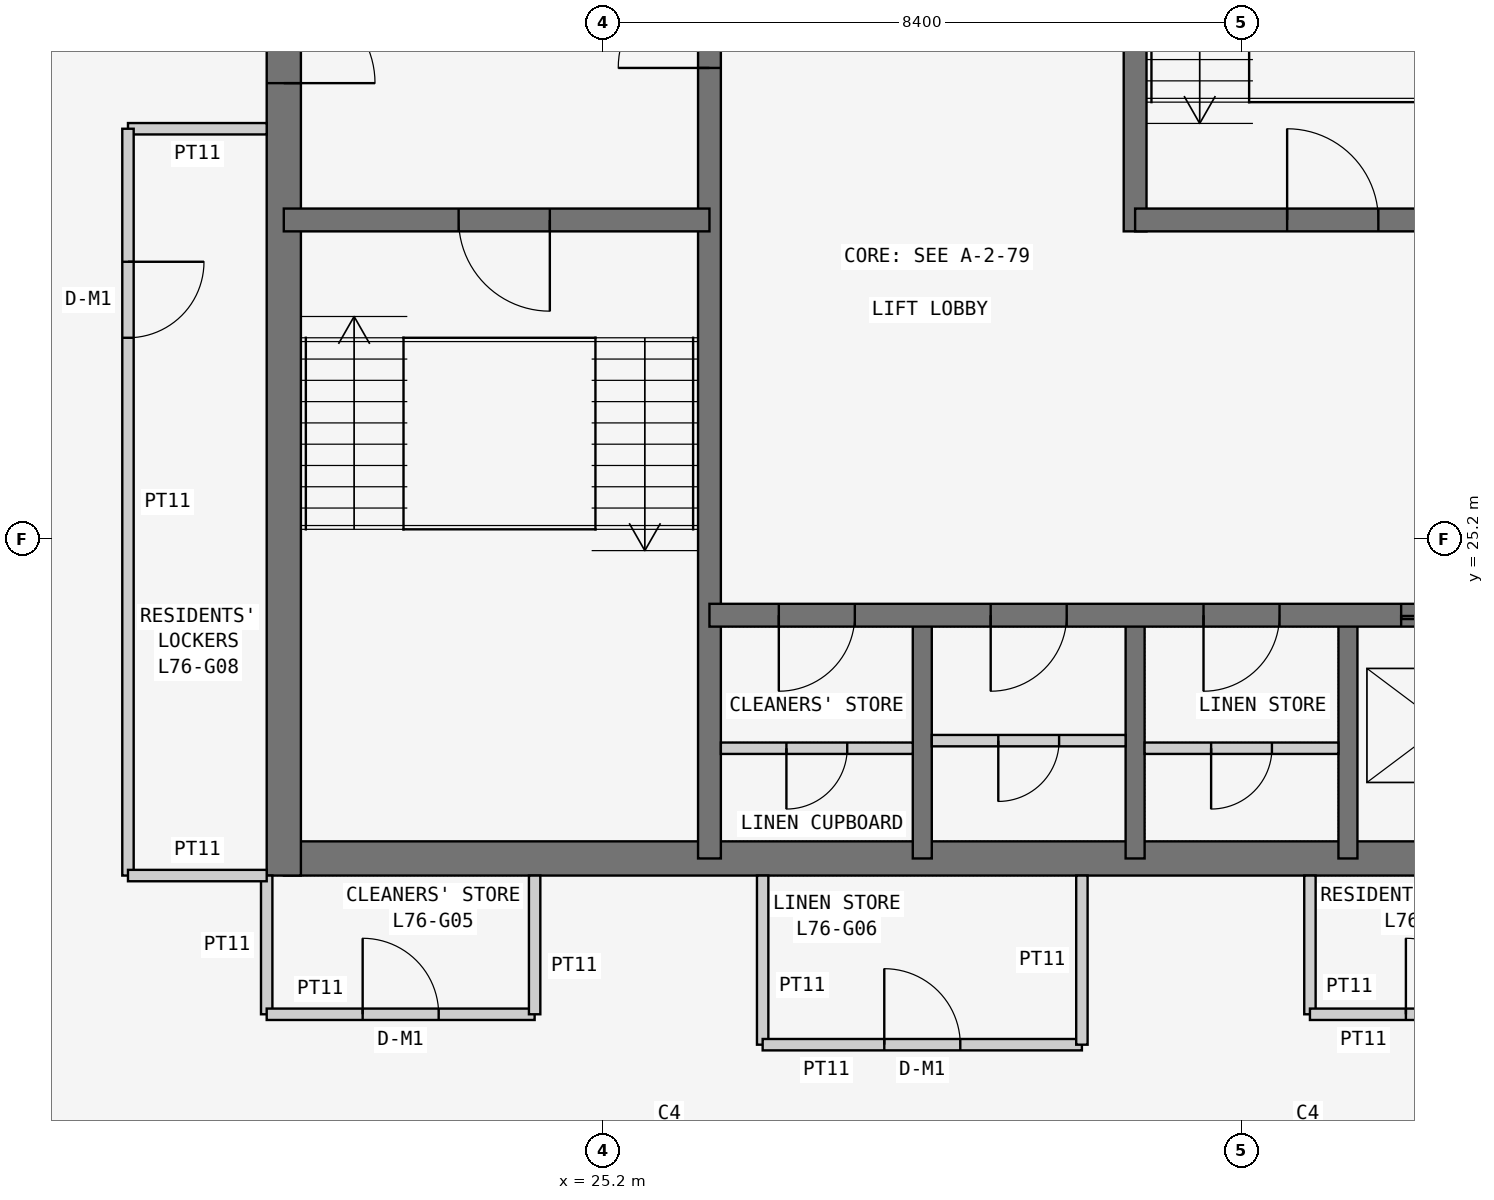
"""IFC4 building model, lengths in metres.
Left out: names, types, materials, properties, quantities, classifications, styles, units other than length and angle.
Written with IfcOpenShell. Run it as: python <this file> out.ifc"""

import sys

from ifc_helpers import new_model, si_unit, direction, frame, frame_2d, origin, place, context, subcontext, project, spatial, rectangle, extrude, element, fill, save


model = new_model("IFC4")
c1 = context("Model", 3, precision=1e-05, world=origin(), true_north=direction((0.0, 1.0)))
c2 = subcontext(c1, "Body", "Model", "MODEL_VIEW")
j1 = project(units=[si_unit("LENGTHUNIT", "METRE"), si_unit("PLANEANGLEUNIT", "RADIAN")], contexts=[c1])
p1 = place(None, origin())
s1 = spatial("IfcSite", under=j1, at=p1, CompositionType="ELEMENT")
p2 = place(p1, origin())
s2 = spatial("IfcBuilding", under=s1, at=p2, CompositionType="ELEMENT")
p3 = place(p2, frame((0.0, 0.0, 290.1)))
s3 = spatial("IfcBuildingStorey", under=s2, at=p3, CompositionType="ELEMENT", Elevation=290.1)
p4 = place(p3, frame((21.0, 21.0, 0.0), z_axis=(0.0, 0.0, 1.0), x_axis=(1.0, 0.0, 0.0)))
e1 = element("IfcWall", 1, at=p4, inside=s3, PredefinedType="SHEAR", context=c2, shape_type="SweptSolid", body=[
    extrude(rectangle(XDim=17.025, YDim=0.45, at=frame_2d((8.512, 0.0))), origin(), (0.0, 0.0, 1.0), 3.6),
])
p5 = place(p3, frame((21.0, 37.8, 0.0), z_axis=(0.0, 0.0, 1.0), x_axis=(0.0, -1.0, 0.0)))
e2 = element("IfcWall", 2, at=p5, inside=s3, PredefinedType="SHEAR", context=c2, shape_type="SweptSolid", body=[
    extrude(rectangle(XDim=17.025, YDim=0.45, at=frame_2d((8.513, 0.0))), origin(), (0.0, 0.0, 1.0), 3.6),
])
p6 = place(p5, frame((5.4, 0.0, 0.0)))
e3 = element("IfcOpeningElement", 3, at=p6, cuts=e2, PredefinedType="OPENING", context=c2, shape_type="SweptSolid", body=[
    extrude(rectangle(XDim=1.2, YDim=2.1, at=frame_2d((0.6, 1.05))), frame((0.0, 0.235, 0.0), z_axis=(0.0, -1.0, 0.0), x_axis=(1.0, 0.0, 0.0)), (0.0, 0.0, 1.0), 0.47),
])
p7 = place(p3, frame((26.6, 21.0, 0.0), z_axis=(0.0, 0.0, 1.0), x_axis=(0.0, 1.0, 0.0)))
e4 = element("IfcWall", 4, at=p7, inside=s3, PredefinedType="SHEAR", context=c2, shape_type="SweptSolid", body=[
    extrude(rectangle(XDim=16.8, YDim=0.3, at=frame_2d((8.4, 0.0))), origin(), (0.0, 0.0, 1.0), 3.6),
])
p8 = place(p7, frame((10.4, 0.0, 0.0)))
e5 = element("IfcOpeningElement", 5, at=p8, cuts=e4, PredefinedType="OPENING", context=c2, shape_type="SweptSolid", body=[
    extrude(rectangle(XDim=1.2, YDim=2.1, at=frame_2d((0.6, 1.05))), frame((0.0, 0.16, 0.0), z_axis=(0.0, -1.0, 0.0), x_axis=(1.0, 0.0, 0.0)), (0.0, 0.0, 1.0), 0.32),
])
p9 = place(p3, frame((21.0, 29.4, 0.0), z_axis=(0.0, 0.0, 1.0), x_axis=(1.0, 0.0, 0.0)))
e6 = element("IfcWall", 6, at=p9, inside=s3, PredefinedType="SHEAR", context=c2, shape_type="SweptSolid", body=[
    extrude(rectangle(XDim=5.6, YDim=0.3, at=frame_2d((2.8, 0.0))), origin(), (0.0, 0.0, 1.0), 3.6),
])
p10 = place(p9, frame((2.3, 0.0, 0.0)))
e7 = element("IfcOpeningElement", 7, at=p10, cuts=e6, PredefinedType="OPENING", context=c2, shape_type="SweptSolid", body=[
    extrude(rectangle(XDim=1.2, YDim=2.1, at=frame_2d((0.6, 1.05))), frame((0.0, 0.16, 0.0), z_axis=(0.0, -1.0, 0.0), x_axis=(1.0, 0.0, 0.0)), (0.0, 0.0, 1.0), 0.32),
])
p11 = place(p3, frame((26.6, 24.2, 0.0), z_axis=(0.0, 0.0, 1.0), x_axis=(1.0, 0.0, 0.0)))
e8 = element("IfcWall", 8, at=p11, inside=s3, PredefinedType="SHEAR", context=c2, shape_type="SweptSolid", body=[
    extrude(rectangle(XDim=11.2, YDim=0.3, at=frame_2d((5.6, 0.0))), origin(), (0.0, 0.0, 1.0), 3.6),
])
p12 = place(p11, frame((0.913, 0.0, 0.0)))
e9 = element("IfcOpeningElement", 9, at=p12, cuts=e8, PredefinedType="OPENING", context=c2, shape_type="SweptSolid", body=[
    extrude(rectangle(XDim=1.0, YDim=2.1, at=frame_2d((0.5, 1.05))), frame((0.0, 0.16, 0.0), z_axis=(0.0, -1.0, 0.0), x_axis=(1.0, 0.0, 0.0)), (0.0, 0.0, 1.0), 0.32),
])
p13 = place(p11, frame((3.7, 0.0, 0.0)))
e10 = element("IfcOpeningElement", 10, at=p13, cuts=e8, PredefinedType="OPENING", context=c2, shape_type="SweptSolid", body=[
    extrude(rectangle(XDim=1.0, YDim=2.1, at=frame_2d((0.5, 1.05))), frame((0.0, 0.16, 0.0), z_axis=(0.0, -1.0, 0.0), x_axis=(1.0, 0.0, 0.0)), (0.0, 0.0, 1.0), 0.32),
])
p14 = place(p11, frame((6.5, 0.0, 0.0)))
e11 = element("IfcOpeningElement", 11, at=p14, cuts=e8, PredefinedType="OPENING", context=c2, shape_type="SweptSolid", body=[
    extrude(rectangle(XDim=1.0, YDim=2.1, at=frame_2d((0.5, 1.05))), frame((0.0, 0.16, 0.0), z_axis=(0.0, -1.0, 0.0), x_axis=(1.0, 0.0, 0.0)), (0.0, 0.0, 1.0), 0.32),
])
p15 = place(p11, frame((9.1, 0.0, 0.0)))
e12 = element("IfcOpeningElement", 12, at=p15, cuts=e8, PredefinedType="OPENING", context=c2, shape_type="SweptSolid", body=[
    extrude(rectangle(XDim=1.1, YDim=2.1, at=frame_2d((0.55, 1.05))), frame((0.0, 0.16, 0.0), z_axis=(0.0, -1.0, 0.0), x_axis=(1.0, 0.0, 0.0)), (0.0, 0.0, 1.0), 0.32),
])
p16 = place(p3, frame((32.2, 29.25, 0.0), z_axis=(0.0, 0.0, 1.0), x_axis=(0.0, 1.0, 0.0)))
e13 = element("IfcWall", 13, at=p16, inside=s3, PredefinedType="SHEAR", context=c2, shape_type="SweptSolid", body=[
    extrude(rectangle(XDim=8.55, YDim=0.3, at=frame_2d((4.275, 0.0))), origin(), (0.0, 0.0, 1.0), 3.6),
])
p17 = place(p3, frame((32.2, 29.4, 0.0), z_axis=(0.0, 0.0, 1.0), x_axis=(1.0, 0.0, 0.0)))
e14 = element("IfcWall", 14, at=p17, inside=s3, PredefinedType="SHEAR", context=c2, shape_type="SweptSolid", body=[
    extrude(rectangle(XDim=5.6, YDim=0.3, at=frame_2d((2.8, 0.0))), origin(), (0.0, 0.0, 1.0), 3.6),
])
p18 = place(p17, frame((2.0, 0.0, 0.0)))
e15 = element("IfcOpeningElement", 15, at=p18, cuts=e14, PredefinedType="OPENING", context=c2, shape_type="SweptSolid", body=[
    extrude(rectangle(XDim=1.2, YDim=2.1, at=frame_2d((0.6, 1.05))), frame((0.0, 0.16, 0.0), z_axis=(0.0, -1.0, 0.0), x_axis=(1.0, 0.0, 0.0)), (0.0, 0.0, 1.0), 0.32),
])
for number, where, z_axis, x_axis in (
    (16, (29.4, 21.0, 0.0), (0.0, 0.0, 1.0), (0.0, 1.0, 0.0)),
    (17, (32.2, 21.0, 0.0), (0.0, 0.0, 1.0), (0.0, 1.0, 0.0)),
    (18, (35.0, 21.0, 0.0), (0.0, 0.0, 1.0), (0.0, 1.0, 0.0)),
):
    element("IfcWall", number, at=place(p3, frame(where, z_axis=z_axis, x_axis=x_axis)), inside=s3, PredefinedType="SHEAR", context=c2, shape_type="SweptSolid", body=[
        extrude(rectangle(XDim=3.2, YDim=0.25, at=frame_2d((1.6, 0.0))), origin(), (0.0, 0.0, 1.0), 3.6),
    ])
p19 = place(p3, frame((20.775, 20.775, 0.0), z_axis=(0.0, 0.0, 1.0), x_axis=(0.0, -1.0, 0.0)))
e19 = element("IfcWall", 19, at=p19, inside=s3, PredefinedType="PARTITIONING", context=c2, shape_type="SweptSolid", body=[
    extrude(rectangle(XDim=1.825, YDim=0.15, at=frame_2d((0.913, 0.0))), origin(), (0.0, 0.0, 1.0), 3.45),
])
p20 = place(p3, frame((20.775, 18.95, 0.0), z_axis=(0.0, 0.0, 1.0), x_axis=(1.0, 0.0, 0.0)))
e20 = element("IfcWall", 20, at=p20, inside=s3, PredefinedType="PARTITIONING", context=c2, shape_type="SweptSolid", body=[
    extrude(rectangle(XDim=3.525, YDim=0.15, at=frame_2d((1.763, 0.0))), origin(), (0.0, 0.0, 1.0), 3.45),
])
p21 = place(p20, frame((1.262, 0.0, 0.0)))
e21 = element("IfcOpeningElement", 21, at=p21, cuts=e20, PredefinedType="OPENING", context=c2, shape_type="SweptSolid", body=[
    extrude(rectangle(XDim=1.0, YDim=2.1, at=frame_2d((0.5, 1.05))), frame((0.0, 0.085, 0.0), z_axis=(0.0, -1.0, 0.0), x_axis=(1.0, 0.0, 0.0)), (0.0, 0.0, 1.0), 0.17),
])
p22 = place(p3, frame((24.3, 18.95, 0.0), z_axis=(0.0, 0.0, 1.0), x_axis=(0.0, 1.0, 0.0)))
e22 = element("IfcWall", 22, at=p22, inside=s3, PredefinedType="PARTITIONING", context=c2, shape_type="SweptSolid", body=[
    extrude(rectangle(XDim=1.825, YDim=0.15, at=frame_2d((0.913, 0.0))), origin(), (0.0, 0.0, 1.0), 3.45),
])
p23 = place(p3, frame((27.3, 20.775, 0.0), z_axis=(0.0, 0.0, 1.0), x_axis=(0.0, -1.0, 0.0)))
e23 = element("IfcWall", 23, at=p23, inside=s3, PredefinedType="PARTITIONING", context=c2, shape_type="SweptSolid", body=[
    extrude(rectangle(XDim=2.225, YDim=0.15, at=frame_2d((1.112, 0.0))), origin(), (0.0, 0.0, 1.0), 3.45),
])
p24 = place(p3, frame((27.3, 18.55, 0.0), z_axis=(0.0, 0.0, 1.0), x_axis=(1.0, 0.0, 0.0)))
e24 = element("IfcWall", 24, at=p24, inside=s3, PredefinedType="PARTITIONING", context=c2, shape_type="SweptSolid", body=[
    extrude(rectangle(XDim=4.2, YDim=0.15, at=frame_2d((2.1, 0.0))), origin(), (0.0, 0.0, 1.0), 3.45),
])
p25 = place(p24, frame((1.6, 0.0, 0.0)))
e25 = element("IfcOpeningElement", 25, at=p25, cuts=e24, PredefinedType="OPENING", context=c2, shape_type="SweptSolid", body=[
    extrude(rectangle(XDim=1.0, YDim=2.1, at=frame_2d((0.5, 1.05))), frame((0.0, 0.085, 0.0), z_axis=(0.0, -1.0, 0.0), x_axis=(1.0, 0.0, 0.0)), (0.0, 0.0, 1.0), 0.17),
])
p26 = place(p3, frame((31.5, 18.55, 0.0), z_axis=(0.0, 0.0, 1.0), x_axis=(0.0, 1.0, 0.0)))
e26 = element("IfcWall", 26, at=p26, inside=s3, PredefinedType="PARTITIONING", context=c2, shape_type="SweptSolid", body=[
    extrude(rectangle(XDim=2.225, YDim=0.15, at=frame_2d((1.112, 0.0))), origin(), (0.0, 0.0, 1.0), 3.45),
])
p27 = place(p3, frame((34.5, 20.775, 0.0), z_axis=(0.0, 0.0, 1.0), x_axis=(0.0, -1.0, 0.0)))
e27 = element("IfcWall", 27, at=p27, inside=s3, PredefinedType="PARTITIONING", context=c2, shape_type="SweptSolid", body=[
    extrude(rectangle(XDim=1.825, YDim=0.15, at=frame_2d((0.913, 0.0))), origin(), (0.0, 0.0, 1.0), 3.45),
])
p28 = place(p3, frame((34.5, 18.95, 0.0), z_axis=(0.0, 0.0, 1.0), x_axis=(1.0, 0.0, 0.0)))
e28 = element("IfcWall", 28, at=p28, inside=s3, PredefinedType="PARTITIONING", context=c2, shape_type="SweptSolid", body=[
    extrude(rectangle(XDim=3.525, YDim=0.15, at=frame_2d((1.762, 0.0))), origin(), (0.0, 0.0, 1.0), 3.45),
])
p29 = place(p28, frame((1.262, 0.0, 0.0)))
e29 = element("IfcOpeningElement", 29, at=p29, cuts=e28, PredefinedType="OPENING", context=c2, shape_type="SweptSolid", body=[
    extrude(rectangle(XDim=1.0, YDim=2.1, at=frame_2d((0.5, 1.05))), frame((0.0, 0.085, 0.0), z_axis=(0.0, -1.0, 0.0), x_axis=(1.0, 0.0, 0.0)), (0.0, 0.0, 1.0), 0.17),
])
p30 = place(p3, frame((20.775, 30.6, 0.0), z_axis=(0.0, 0.0, 1.0), x_axis=(-1.0, 0.0, 0.0)))
e30 = element("IfcWall", 30, at=p30, inside=s3, PredefinedType="PARTITIONING", context=c2, shape_type="SweptSolid", body=[
    extrude(rectangle(XDim=1.825, YDim=0.15, at=frame_2d((0.913, 0.0))), origin(), (0.0, 0.0, 1.0), 3.45),
])
p31 = place(p3, frame((18.95, 30.6, 0.0), z_axis=(0.0, 0.0, 1.0), x_axis=(0.0, -1.0, 0.0)))
e31 = element("IfcWall", 31, at=p31, inside=s3, PredefinedType="PARTITIONING", context=c2, shape_type="SweptSolid", body=[
    extrude(rectangle(XDim=9.825, YDim=0.15, at=frame_2d((4.913, 0.0))), origin(), (0.0, 0.0, 1.0), 3.45),
])
p32 = place(p31, frame((1.75, 0.0, 0.0)))
e32 = element("IfcOpeningElement", 32, at=p32, cuts=e31, PredefinedType="OPENING", context=c2, shape_type="SweptSolid", body=[
    extrude(rectangle(XDim=1.0, YDim=2.1, at=frame_2d((0.5, 1.05))), frame((0.0, 0.085, 0.0), z_axis=(0.0, -1.0, 0.0), x_axis=(1.0, 0.0, 0.0)), (0.0, 0.0, 1.0), 0.17),
])
p33 = place(p3, frame((18.95, 20.775, 0.0), z_axis=(0.0, 0.0, 1.0), x_axis=(1.0, 0.0, 0.0)))
e33 = element("IfcWall", 33, at=p33, inside=s3, PredefinedType="PARTITIONING", context=c2, shape_type="SweptSolid", body=[
    extrude(rectangle(XDim=1.825, YDim=0.15, at=frame_2d((0.913, 0.0))), origin(), (0.0, 0.0, 1.0), 3.45),
])
p34 = place(p3, frame((26.75, 22.45, 0.0), z_axis=(0.0, 0.0, 1.0), x_axis=(1.0, 0.0, 0.0)))
e34 = element("IfcWall", 34, at=p34, inside=s3, PredefinedType="PARTITIONING", context=c2, shape_type="SweptSolid", body=[
    extrude(rectangle(XDim=2.525, YDim=0.15, at=frame_2d((1.262, 0.0))), origin(), (0.0, 0.0, 1.0), 3.45),
])
p35 = place(p34, frame((0.863, 0.0, 0.0)))
e35 = element("IfcOpeningElement", 35, at=p35, cuts=e34, PredefinedType="OPENING", context=c2, shape_type="SweptSolid", body=[
    extrude(rectangle(XDim=0.8, YDim=2.1, at=frame_2d((0.4, 1.05))), frame((0.0, 0.085, 0.0), z_axis=(0.0, -1.0, 0.0), x_axis=(1.0, 0.0, 0.0)), (0.0, 0.0, 1.0), 0.17),
])
p36 = place(p3, frame((29.525, 22.55, 0.0), z_axis=(0.0, 0.0, 1.0), x_axis=(1.0, 0.0, 0.0)))
e36 = element("IfcWall", 36, at=p36, inside=s3, PredefinedType="PARTITIONING", context=c2, shape_type="SweptSolid", body=[
    extrude(rectangle(XDim=2.55, YDim=0.15, at=frame_2d((1.275, 0.0))), origin(), (0.0, 0.0, 1.0), 3.45),
])
p37 = place(p36, frame((0.875, 0.0, 0.0)))
e37 = element("IfcOpeningElement", 37, at=p37, cuts=e36, PredefinedType="OPENING", context=c2, shape_type="SweptSolid", body=[
    extrude(rectangle(XDim=0.8, YDim=2.1, at=frame_2d((0.4, 1.05))), frame((0.0, 0.085, 0.0), z_axis=(0.0, -1.0, 0.0), x_axis=(1.0, 0.0, 0.0)), (0.0, 0.0, 1.0), 0.17),
])
p38 = place(p3, frame((32.325, 22.45, 0.0), z_axis=(0.0, 0.0, 1.0), x_axis=(1.0, 0.0, 0.0)))
e38 = element("IfcWall", 38, at=p38, inside=s3, PredefinedType="PARTITIONING", context=c2, shape_type="SweptSolid", body=[
    extrude(rectangle(XDim=2.55, YDim=0.15, at=frame_2d((1.275, 0.0))), origin(), (0.0, 0.0, 1.0), 3.45),
])
p39 = place(p38, frame((0.875, 0.0, 0.0)))
e39 = element("IfcOpeningElement", 39, at=p39, cuts=e38, PredefinedType="OPENING", context=c2, shape_type="SweptSolid", body=[
    extrude(rectangle(XDim=0.8, YDim=2.1, at=frame_2d((0.4, 1.05))), frame((0.0, 0.085, 0.0), z_axis=(0.0, -1.0, 0.0), x_axis=(1.0, 0.0, 0.0)), (0.0, 0.0, 1.0), 0.17),
])
p40 = place(p21, origin())
e40 = element("IfcDoor", 40, at=p40, inside=s3, OperationType="SINGLE_SWING_LEFT", PredefinedType="DOOR", context=c2, shape_type="SweptSolid", body=[
    extrude(rectangle(XDim=1.0, YDim=2.1, at=frame_2d((0.5, 1.05))), frame((0.0, 0.025, 0.0), z_axis=(0.0, -1.0, 0.0), x_axis=(1.0, 0.0, 0.0)), (0.0, 0.0, 1.0), 0.05),
])
fill(e21, e40)
p41 = place(p25, origin())
e41 = element("IfcDoor", 41, at=p41, inside=s3, OperationType="SINGLE_SWING_LEFT", PredefinedType="DOOR", context=c2, shape_type="SweptSolid", body=[
    extrude(rectangle(XDim=1.0, YDim=2.1, at=frame_2d((0.5, 1.05))), frame((0.0, 0.025, 0.0), z_axis=(0.0, -1.0, 0.0), x_axis=(1.0, 0.0, 0.0)), (0.0, 0.0, 1.0), 0.05),
])
fill(e25, e41)
p42 = place(p29, origin())
e42 = element("IfcDoor", 42, at=p42, inside=s3, OperationType="SINGLE_SWING_LEFT", PredefinedType="DOOR", context=c2, shape_type="SweptSolid", body=[
    extrude(rectangle(XDim=1.0, YDim=2.1, at=frame_2d((0.5, 1.05))), frame((0.0, 0.025, 0.0), z_axis=(0.0, -1.0, 0.0), x_axis=(1.0, 0.0, 0.0)), (0.0, 0.0, 1.0), 0.05),
])
fill(e29, e42)
p43 = place(p32, origin())
e43 = element("IfcDoor", 43, at=p43, inside=s3, OperationType="SINGLE_SWING_LEFT", PredefinedType="DOOR", context=c2, shape_type="SweptSolid", body=[
    extrude(rectangle(XDim=1.0, YDim=2.1, at=frame_2d((0.5, 1.05))), frame((0.0, 0.025, 0.0), z_axis=(0.0, -1.0, 0.0), x_axis=(1.0, 0.0, 0.0)), (0.0, 0.0, 1.0), 0.05),
])
fill(e32, e43)
p44 = place(p6, origin())
e44 = element("IfcDoor", 44, at=p44, inside=s3, OperationType="SINGLE_SWING_RIGHT", PredefinedType="DOOR", context=c2, shape_type="SweptSolid", body=[
    extrude(rectangle(XDim=1.2, YDim=2.1, at=frame_2d((0.6, 1.05))), frame((0.0, 0.025, 0.0), z_axis=(0.0, -1.0, 0.0), x_axis=(1.0, 0.0, 0.0)), (0.0, 0.0, 1.0), 0.05),
])
fill(e3, e44)
p45 = place(p10, frame((1.2, 0.0, 0.0), z_axis=(0.0, 0.0, 1.0), x_axis=(-1.0, 0.0, 0.0)))
e45 = element("IfcDoor", 45, at=p45, inside=s3, OperationType="SINGLE_SWING_LEFT", PredefinedType="DOOR", context=c2, shape_type="SweptSolid", body=[
    extrude(rectangle(XDim=1.2, YDim=2.1, at=frame_2d((0.6, 1.05))), frame((0.0, 0.025, 0.0), z_axis=(0.0, -1.0, 0.0), x_axis=(1.0, 0.0, 0.0)), (0.0, 0.0, 1.0), 0.05),
])
fill(e7, e45)
p46 = place(p8, origin())
e46 = element("IfcDoor", 46, at=p46, inside=s3, OperationType="SINGLE_SWING_LEFT", PredefinedType="DOOR", context=c2, shape_type="SweptSolid", body=[
    extrude(rectangle(XDim=1.2, YDim=2.1, at=frame_2d((0.6, 1.05))), frame((0.0, 0.025, 0.0), z_axis=(0.0, -1.0, 0.0), x_axis=(1.0, 0.0, 0.0)), (0.0, 0.0, 1.0), 0.05),
])
fill(e5, e46)
p47 = place(p18, origin())
e47 = element("IfcDoor", 47, at=p47, inside=s3, OperationType="SINGLE_SWING_LEFT", PredefinedType="DOOR", context=c2, shape_type="SweptSolid", body=[
    extrude(rectangle(XDim=1.2, YDim=2.1, at=frame_2d((0.6, 1.05))), frame((0.0, 0.025, 0.0), z_axis=(0.0, -1.0, 0.0), x_axis=(1.0, 0.0, 0.0)), (0.0, 0.0, 1.0), 0.05),
])
fill(e15, e47)
p48 = place(p12, frame((1.0, 0.0, 0.0), z_axis=(0.0, 0.0, 1.0), x_axis=(-1.0, 0.0, 0.0)))
e48 = element("IfcDoor", 48, at=p48, inside=s3, OperationType="SINGLE_SWING_RIGHT", PredefinedType="DOOR", context=c2, shape_type="SweptSolid", body=[
    extrude(rectangle(XDim=1.0, YDim=2.1, at=frame_2d((0.5, 1.05))), frame((0.0, 0.025, 0.0), z_axis=(0.0, -1.0, 0.0), x_axis=(1.0, 0.0, 0.0)), (0.0, 0.0, 1.0), 0.05),
])
fill(e9, e48)
p49 = place(p35, frame((0.8, 0.0, 0.0), z_axis=(0.0, 0.0, 1.0), x_axis=(-1.0, 0.0, 0.0)))
e49 = element("IfcDoor", 49, at=p49, inside=s3, OperationType="SINGLE_SWING_RIGHT", PredefinedType="DOOR", context=c2, shape_type="SweptSolid", body=[
    extrude(rectangle(XDim=0.8, YDim=2.1, at=frame_2d((0.4, 1.05))), frame((0.0, 0.025, 0.0), z_axis=(0.0, -1.0, 0.0), x_axis=(1.0, 0.0, 0.0)), (0.0, 0.0, 1.0), 0.05),
])
fill(e35, e49)
p50 = place(p13, frame((1.0, 0.0, 0.0), z_axis=(0.0, 0.0, 1.0), x_axis=(-1.0, 0.0, 0.0)))
e50 = element("IfcDoor", 50, at=p50, inside=s3, OperationType="SINGLE_SWING_RIGHT", PredefinedType="DOOR", context=c2, shape_type="SweptSolid", body=[
    extrude(rectangle(XDim=1.0, YDim=2.1, at=frame_2d((0.5, 1.05))), frame((0.0, 0.025, 0.0), z_axis=(0.0, -1.0, 0.0), x_axis=(1.0, 0.0, 0.0)), (0.0, 0.0, 1.0), 0.05),
])
fill(e10, e50)
p51 = place(p37, frame((0.8, 0.0, 0.0), z_axis=(0.0, 0.0, 1.0), x_axis=(-1.0, 0.0, 0.0)))
e51 = element("IfcDoor", 51, at=p51, inside=s3, OperationType="SINGLE_SWING_RIGHT", PredefinedType="DOOR", context=c2, shape_type="SweptSolid", body=[
    extrude(rectangle(XDim=0.8, YDim=2.1, at=frame_2d((0.4, 1.05))), frame((0.0, 0.025, 0.0), z_axis=(0.0, -1.0, 0.0), x_axis=(1.0, 0.0, 0.0)), (0.0, 0.0, 1.0), 0.05),
])
fill(e37, e51)
p52 = place(p14, frame((1.0, 0.0, 0.0), z_axis=(0.0, 0.0, 1.0), x_axis=(-1.0, 0.0, 0.0)))
e52 = element("IfcDoor", 52, at=p52, inside=s3, OperationType="SINGLE_SWING_RIGHT", PredefinedType="DOOR", context=c2, shape_type="SweptSolid", body=[
    extrude(rectangle(XDim=1.0, YDim=2.1, at=frame_2d((0.5, 1.05))), frame((0.0, 0.025, 0.0), z_axis=(0.0, -1.0, 0.0), x_axis=(1.0, 0.0, 0.0)), (0.0, 0.0, 1.0), 0.05),
])
fill(e11, e52)
p53 = place(p39, frame((0.8, 0.0, 0.0), z_axis=(0.0, 0.0, 1.0), x_axis=(-1.0, 0.0, 0.0)))
e53 = element("IfcDoor", 53, at=p53, inside=s3, OperationType="SINGLE_SWING_RIGHT", PredefinedType="DOOR", context=c2, shape_type="SweptSolid", body=[
    extrude(rectangle(XDim=0.8, YDim=2.1, at=frame_2d((0.4, 1.05))), frame((0.0, 0.025, 0.0), z_axis=(0.0, -1.0, 0.0), x_axis=(1.0, 0.0, 0.0)), (0.0, 0.0, 1.0), 0.05),
])
fill(e39, e53)
p54 = place(p15, origin())
e54 = element("IfcDoor", 54, at=p54, inside=s3, OperationType="DOUBLE_DOOR_SLIDING", PredefinedType="DOOR", context=c2, shape_type="SweptSolid", body=[
    extrude(rectangle(XDim=1.1, YDim=2.1, at=frame_2d((0.55, 1.05))), frame((0.0, 0.025, 0.0), z_axis=(0.0, -1.0, 0.0), x_axis=(1.0, 0.0, 0.0)), (0.0, 0.0, 1.0), 0.05),
])
fill(e12, e54)
save(model, sys.argv[1])
